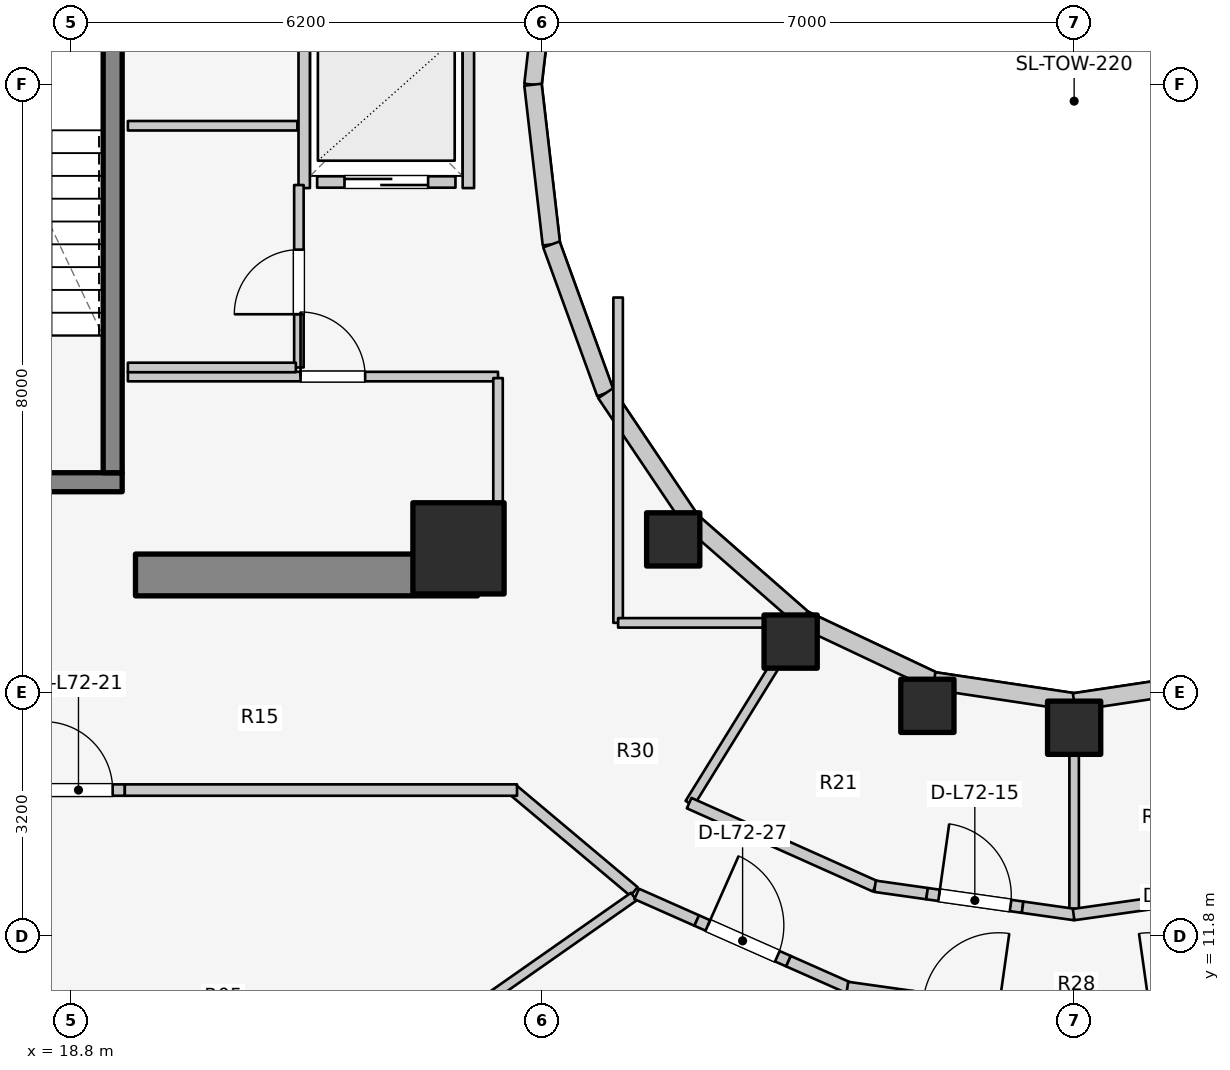
"""IFC4 building model, lengths in metres.
Left out: names, types, materials, properties, quantities, classifications, styles, units other than length and angle.
Written with IfcOpenShell. Run it as: python <this file> out.ifc"""

import sys

from ifc_helpers import new_model, si_unit, direction, frame, frame_2d, origin, origin_2d, place, context, subcontext, project, spatial, rectangle, extrude, element, fill, save


model = new_model("IFC4")
c1 = context("Model", 3, precision=1e-05, world=origin(), true_north=direction((0.0, 1.0)))
c2 = subcontext(c1, "Body", "Model", "MODEL_VIEW")
j1 = project(units=[si_unit("LENGTHUNIT", "METRE"), si_unit("PLANEANGLEUNIT", "RADIAN")], contexts=[c1])
p1 = place(None, origin())
s1 = spatial("IfcSite", under=j1, at=p1, CompositionType="ELEMENT")
p2 = place(p1, origin())
s2 = spatial("IfcBuilding", under=s1, at=p2, CompositionType="ELEMENT")
p3 = place(p2, frame((0.0, 0.0, 235.7)))
s3 = spatial("IfcBuildingStorey", under=s2, at=p3, CompositionType="ELEMENT", Elevation=235.7)
p4 = place(p3, frame((19.65, 16.55, 0.0), z_axis=(0.0, 0.0, 1.0), x_axis=(1.0, 0.0, 0.0)))
e1 = element("IfcWall", 1, at=p4, inside=s3, PredefinedType="SHEAR", context=c2, shape_type="SweptSolid", body=[
    extrude(rectangle(XDim=4.5, YDim=0.55, at=frame_2d((2.25, 0.0))), origin(), (0.0, 0.0, 1.0), 3.1),
])
p5 = place(p3, frame((16.105, 17.77, 0.0), z_axis=(0.0, 0.0, 1.0), x_axis=(1.0, 0.0, 0.0)))
e2 = element("IfcWall", 2, at=p5, inside=s3, PredefinedType="SOLIDWALL", context=c2, shape_type="SweptSolid", body=[
    extrude(rectangle(XDim=3.37, YDim=0.25, at=frame_2d((1.685, 0.0))), origin(), (0.0, 0.0, 1.0), 3.1),
])
p6 = place(p5, frame((1.135, 0.0, 0.0)))
e3 = element("IfcOpeningElement", 3, at=p6, cuts=e2, PredefinedType="OPENING", context=c2, shape_type="SweptSolid", body=[
    extrude(rectangle(XDim=1.1, YDim=2.1, at=frame_2d((0.55, 1.05))), frame((0.0, 0.135, 0.0), z_axis=(0.0, -1.0, 0.0), x_axis=(1.0, 0.0, 0.0)), (0.0, 0.0, 1.0), 0.27),
])
p7 = place(p3, frame((19.35, 17.895, 0.0), z_axis=(0.0, 0.0, 1.0), x_axis=(0.0, 1.0, 0.0)))
e4 = element("IfcWall", 4, at=p7, inside=s3, PredefinedType="SOLIDWALL", context=c2, shape_type="SweptSolid", body=[
    extrude(rectangle(XDim=7.81, YDim=0.25, at=frame_2d((3.905, 0.0))), origin(), (0.0, 0.0, 1.0), 3.1),
])
p8 = place(p3, frame((23.9, 16.9, 0.0), z_axis=(0.0, 0.0, 1.0), x_axis=(1.0, 0.0, 0.0)))
e5 = element("IfcColumn", 5, at=p8, inside=s3, PredefinedType="COLUMN", context=c2, shape_type="SweptSolid", body=[
    extrude(rectangle(XDim=1.2, YDim=1.2, at=origin_2d()), origin(), (0.0, 0.0, 1.0), 3.1),
])
for number, where, z_axis, x_axis in (
    (6, (26.725, 17.018, 0.0), (0.0, 0.0, 1.0), (1.0, 0.0, 0.0)),
    (7, (28.27, 15.673, 0.0), (0.0, 0.0, 1.0), (1.0, 0.0, 0.0)),
    (8, (30.069, 14.828, 0.0), (0.0, 0.0, 1.0), (1.0, 0.0, 0.0)),
    (9, (32.0, 14.54, 0.0), (0.0, 0.0, 1.0), (1.0, 0.0, 0.0)),
):
    element("IfcColumn", number, at=place(p3, frame(where, z_axis=z_axis, x_axis=x_axis)), inside=s3, PredefinedType="COLUMN", context=c2, shape_type="SweptSolid", body=[
        extrude(rectangle(XDim=0.7, YDim=0.7, at=origin_2d()), origin(), (0.0, 0.0, 1.0), 3.1),
    ])
for number, where, z_axis, x_axis in (
    (10, (25.123, 25.102, 0.0), (0.0, 0.0, 1.0), (-0.115, -0.993, 0.0)),
    (11, (24.88, 23.0, 0.0), (0.0, 0.0, 1.0), (0.115, -0.993, 0.0)),
):
    element("IfcWall", number, at=place(p3, frame(where, z_axis=z_axis, x_axis=x_axis)), inside=s3, PredefinedType="STANDARD", context=c2, shape_type="SweptSolid", body=[
        extrude(rectangle(XDim=2.115, YDim=0.23, at=frame_2d((1.058, 0.0))), origin(), (0.0, 0.0, 1.0), 2.56),
    ])
p9 = place(p3, frame((25.123, 20.898, 0.0), z_axis=(0.0, 0.0, 1.0), x_axis=(0.341423187295, -0.93990968033, 0.0)))
e12 = element("IfcWall", 12, at=p9, inside=s3, PredefinedType="STANDARD", context=c2, shape_type="SweptSolid", body=[
    extrude(rectangle(XDim=2.084, YDim=0.23, at=frame_2d((1.042, 0.0))), origin(), (0.0, 0.0, 1.0), 2.56),
])
p10 = place(p3, frame((25.834, 18.94, 0.0), z_axis=(0.0, 0.0, 1.0), x_axis=(0.558197800898, -0.829707909492, 0.0)))
e13 = element("IfcWall", 13, at=p10, inside=s3, PredefinedType="STANDARD", context=c2, shape_type="SweptSolid", body=[
    extrude(rectangle(XDim=2.027, YDim=0.23, at=frame_2d((1.013, 0.0))), origin(), (0.0, 0.0, 1.0), 1.22),
])
p11 = place(p3, frame((26.965, 17.258, 0.0), z_axis=(0.0, 0.0, 1.0), x_axis=(0.752576694707, -0.658504607869, 0.0)))
e14 = element("IfcWall", 14, at=p11, inside=s3, PredefinedType="STANDARD", context=c2, shape_type="SweptSolid", body=[
    extrude(rectangle(XDim=1.959, YDim=0.23, at=frame_2d((0.98, 0.0))), origin(), (0.0, 0.0, 1.0), 1.22),
])
p12 = place(p3, frame((28.44, 15.968, 0.0), z_axis=(0.0, 0.0, 1.0), x_axis=(0.904179699603, -0.427152280606, 0.0)))
e15 = element("IfcWall", 15, at=p12, inside=s3, PredefinedType="STANDARD", context=c2, shape_type="SweptSolid", body=[
    extrude(rectangle(XDim=1.899, YDim=0.23, at=frame_2d((0.95, 0.0))), origin(), (0.0, 0.0, 1.0), 1.22),
])
for number, where, z_axis, x_axis in (
    (16, (30.157, 15.157, 0.0), (0.0, 0.0, 1.0), (0.989, -0.149, 0.0)),
    (17, (32.0, 14.88, 0.0), (0.0, 0.0, 1.0), (0.989, 0.149, 0.0)),
):
    element("IfcWall", number, at=place(p3, frame(where, z_axis=z_axis, x_axis=x_axis)), inside=s3, PredefinedType="STANDARD", context=c2, shape_type="SweptSolid", body=[
        extrude(rectangle(XDim=1.864, YDim=0.23, at=frame_2d((0.932, 0.0))), origin(), (0.0, 0.0, 1.0), 1.22),
    ])
p13 = place(p3, frame((22.04, 21.72, 0.0), z_axis=(0.0, 0.0, 1.0), x_axis=(1.0, 0.0, 0.0)))
e18 = element("IfcWall", 18, at=p13, inside=s3, PredefinedType="SOLIDWALL", context=c2, shape_type="SweptSolid", body=[
    extrude(rectangle(XDim=1.82, YDim=0.15, at=frame_2d((0.91, 0.0))), origin(), (0.0, 0.0, 1.0), 2.12),
])
p14 = place(p13, frame((0.36, 0.0, 0.0)))
e19 = element("IfcOpeningElement", 19, at=p14, cuts=e18, PredefinedType="OPENING", context=c2, shape_type="SweptSolid", body=[
    extrude(rectangle(XDim=1.1, YDim=2.1, at=frame_2d((0.55, 1.05))), frame((0.0, 0.085, 0.0), z_axis=(0.0, -1.0, 0.0), x_axis=(1.0, 0.0, 0.0)), (0.0, 0.0, 1.0), 0.17),
])
p15 = place(p3, frame((21.87, 21.64, 0.0), z_axis=(0.0, 0.0, 1.0), x_axis=(0.0, 1.0, 0.0)))
e20 = element("IfcWall", 20, at=p15, inside=s3, PredefinedType="SOLIDWALL", context=c2, shape_type="SweptSolid", body=[
    extrude(rectangle(XDim=2.32, YDim=0.15, at=frame_2d((1.16, 0.0))), origin(), (0.0, 0.0, 1.0), 2.575),
])
p16 = place(p3, frame((24.03, 21.64, 0.0), z_axis=(0.0, 0.0, 1.0), x_axis=(0.0, 1.0, 0.0)))
e21 = element("IfcWall", 21, at=p16, inside=s3, PredefinedType="SOLIDWALL", context=c2, shape_type="SweptSolid", body=[
    extrude(rectangle(XDim=2.32, YDim=0.15, at=frame_2d((1.16, 0.0))), origin(), (0.0, 0.0, 1.0), 2.12),
])
p17 = place(p3, frame((19.55, 19.16, 0.0), z_axis=(0.0, 0.0, 1.0), x_axis=(1.0, 0.0, 0.0)))
e22 = element("IfcWall", 22, at=p17, inside=s3, PredefinedType="PARTITIONING", context=c2, shape_type="SweptSolid", body=[
    extrude(rectangle(XDim=4.87, YDim=0.125, at=frame_2d((2.435, 0.0))), origin(), (0.0, 0.0, 1.0), 2.12),
])
p18 = place(p17, frame((2.272, 0.0, 0.0)))
e23 = element("IfcOpeningElement", 23, at=p18, cuts=e22, PredefinedType="OPENING", context=c2, shape_type="SweptSolid", body=[
    extrude(rectangle(XDim=0.85, YDim=2.05, at=frame_2d((0.425, 1.025))), frame((0.0, 0.073, 0.0), z_axis=(0.0, -1.0, 0.0), x_axis=(1.0, 0.0, 0.0)), (0.0, 0.0, 1.0), 0.145),
])
p19 = place(p3, frame((24.42, 17.1, 0.0), z_axis=(0.0, 0.0, 1.0), x_axis=(0.0, 1.0, 0.0)))
e24 = element("IfcWall", 24, at=p19, inside=s3, PredefinedType="PARTITIONING", context=c2, shape_type="SweptSolid", body=[
    extrude(rectangle(XDim=2.04, YDim=0.125, at=frame_2d((1.02, 0.0))), origin(), (0.0, 0.0, 1.0), 1.952),
])
p20 = place(p3, frame((21.8, 19.28, 0.0), z_axis=(0.0, 0.0, 1.0), x_axis=(0.0, 1.0, 0.0)))
e25 = element("IfcWall", 25, at=p20, inside=s3, PredefinedType="PARTITIONING", context=c2, shape_type="SweptSolid", body=[
    extrude(rectangle(XDim=2.4, YDim=0.125, at=frame_2d((1.2, 0.0))), origin(), (0.0, 0.0, 1.0), 2.575),
])
p21 = place(p20, frame((0.7, 0.0, 0.0)))
e26 = element("IfcOpeningElement", 26, at=p21, cuts=e25, PredefinedType="OPENING", context=c2, shape_type="SweptSolid", body=[
    extrude(rectangle(XDim=0.85, YDim=2.05, at=frame_2d((0.425, 1.025))), frame((0.0, 0.073, 0.0), z_axis=(0.0, -1.0, 0.0), x_axis=(1.0, 0.0, 0.0)), (0.0, 0.0, 1.0), 0.145),
])
p22 = place(p3, frame((19.55, 19.28, 0.0), z_axis=(0.0, 0.0, 1.0), x_axis=(1.0, 0.0, 0.0)))
e27 = element("IfcWall", 27, at=p22, inside=s3, PredefinedType="PARTITIONING", context=c2, shape_type="SweptSolid", body=[
    extrude(rectangle(XDim=2.21, YDim=0.125, at=frame_2d((1.105, 0.0))), origin(), (0.0, 0.0, 1.0), 2.12),
])
p23 = place(p3, frame((19.55, 22.46, 0.0), z_axis=(0.0, 0.0, 1.0), x_axis=(1.0, 0.0, 0.0)))
e28 = element("IfcWall", 28, at=p23, inside=s3, PredefinedType="PARTITIONING", context=c2, shape_type="SweptSolid", body=[
    extrude(rectangle(XDim=2.23, YDim=0.125, at=frame_2d((1.115, 0.0))), origin(), (0.0, 0.0, 1.0), 2.575),
])
p24 = place(p3, frame((28.45, 15.985, 0.0), z_axis=(0.0, 0.0, 1.0), x_axis=(-0.52592395012, -0.850531597702, 0.0)))
e29 = element("IfcWall", 29, at=p24, inside=s3, PredefinedType="PARTITIONING", context=c2, shape_type="SweptSolid", body=[
    extrude(rectangle(XDim=2.869, YDim=0.125, at=frame_2d((1.435, 0.0))), origin(), (0.0, 0.0, 1.0), 2.096),
])
p25 = place(p3, frame((32.0, 14.9, 0.0), z_axis=(0.0, 0.0, 1.0), x_axis=(0.0, -1.0, 0.0)))
e30 = element("IfcWall", 30, at=p25, inside=s3, PredefinedType="PARTITIONING", context=c2, shape_type="SweptSolid", body=[
    extrude(rectangle(XDim=2.818, YDim=0.125, at=frame_2d((1.409, 0.0))), origin(), (0.0, 0.0, 1.0), 2.096),
])
p26 = place(p3, frame((26.935, 13.549, 0.0), z_axis=(0.0, 0.0, 1.0), x_axis=(0.912859324183, -0.408274239027, 0.0)))
e31 = element("IfcWall", 31, at=p26, inside=s3, PredefinedType="PARTITIONING", context=c2, shape_type="SweptSolid", body=[
    extrude(rectangle(XDim=2.682, YDim=0.15, at=frame_2d((1.341, 0.0))), origin(), (0.0, 0.0, 1.0), 2.096),
])
p27 = place(p3, frame((29.38, 12.455, 0.0), z_axis=(0.0, 0.0, 1.0), x_axis=(0.990090139669, -0.140433312754, 0.0)))
e32 = element("IfcWall", 32, at=p27, inside=s3, PredefinedType="PARTITIONING", context=c2, shape_type="SweptSolid", body=[
    extrude(rectangle(XDim=0.692, YDim=0.15, at=frame_2d((0.346, 0.0))), origin(), (0.0, 0.0, 1.0), 2.575),
])
p28 = place(p3, frame((30.065, 12.357, 0.0), z_axis=(0.0, 0.0, 1.0), x_axis=(0.990102710588, -0.140344656064, 0.0)))
e33 = element("IfcWall", 33, at=p28, inside=s3, PredefinedType="PARTITIONING", context=c2, shape_type="SweptSolid", body=[
    extrude(rectangle(XDim=1.27, YDim=0.15, at=frame_2d((0.635, 0.0))), origin(), (0.0, 0.0, 1.0), 2.575),
])
p29 = place(p28, frame((0.16, 0.0, 0.0)))
e34 = element("IfcOpeningElement", 34, at=p29, cuts=e33, PredefinedType="OPENING", context=c2, shape_type="SweptSolid", body=[
    extrude(rectangle(XDim=0.95, YDim=2.1, at=frame_2d((0.475, 1.05))), frame((0.0, 0.085, 0.0), z_axis=(0.0, -1.0, 0.0), x_axis=(1.0, 0.0, 0.0)), (0.0, 0.0, 1.0), 0.17),
])
p30 = place(p3, frame((31.322, 12.179, 0.0), z_axis=(0.0, 0.0, 1.0), x_axis=(0.990090139669, -0.140433312754, 0.0)))
e35 = element("IfcWall", 35, at=p30, inside=s3, PredefinedType="PARTITIONING", context=c2, shape_type="SweptSolid", body=[
    extrude(rectangle(XDim=0.692, YDim=0.15, at=frame_2d((0.346, 0.0))), origin(), (0.0, 0.0, 1.0), 2.096),
])
p31 = place(p3, frame((31.993, 12.082, 0.0), z_axis=(0.0, 0.0, 1.0), x_axis=(0.990096156252, 0.140390887794, 0.0)))
e36 = element("IfcWall", 36, at=p31, inside=s3, PredefinedType="PARTITIONING", context=c2, shape_type="SweptSolid", body=[
    extrude(rectangle(XDim=2.654, YDim=0.15, at=frame_2d((1.327, 0.0))), origin(), (0.0, 0.0, 1.0), 2.096),
])
p32 = place(p3, frame((26.0, 15.92, 0.0), z_axis=(0.0, 0.0, 1.0), x_axis=(0.0, 1.0, 0.0)))
e37 = element("IfcWall", 37, at=p32, inside=s3, PredefinedType="PARTITIONING", context=c2, shape_type="SweptSolid", body=[
    extrude(rectangle(XDim=4.28, YDim=0.125, at=frame_2d((2.14, 0.0))), origin(), (0.0, 0.0, 1.0), 1.952),
])
p33 = place(p3, frame((26.0, 15.92, 0.0), z_axis=(0.0, 0.0, 1.0), x_axis=(1.0, 0.0, 0.0)))
e38 = element("IfcWall", 38, at=p33, inside=s3, PredefinedType="PARTITIONING", context=c2, shape_type="SweptSolid", body=[
    extrude(rectangle(XDim=2.6, YDim=0.125, at=frame_2d((1.3, 0.0))), origin(), (0.0, 0.0, 1.0), 1.952),
])
p34 = place(p3, frame((26.209, 12.385, 0.0), z_axis=(0.0, 0.0, 1.0), x_axis=(-0.765677451641, 0.643224719711, 0.0)))
e39 = element("IfcWall", 39, at=p34, inside=s3, PredefinedType="PARTITIONING", context=c2, shape_type="SweptSolid", body=[
    extrude(rectangle(XDim=2.105, YDim=0.15, at=frame_2d((1.053, 0.0))), origin(), (0.0, 0.0, 1.0), 2.096),
])
p35 = place(p3, frame((18.29, 13.72, 0.0), z_axis=(0.0, 0.0, 1.0), x_axis=(1.0, 0.0, 0.0)))
e40 = element("IfcWall", 40, at=p35, inside=s3, PredefinedType="PARTITIONING", context=c2, shape_type="SweptSolid", body=[
    extrude(rectangle(XDim=1.22, YDim=0.15, at=frame_2d((0.61, 0.0))), origin(), (0.0, 0.0, 1.0), 2.575),
])
p36 = place(p35, frame((0.16, 0.0, 0.0)))
e41 = element("IfcOpeningElement", 41, at=p36, cuts=e40, PredefinedType="OPENING", context=c2, shape_type="SweptSolid", body=[
    extrude(rectangle(XDim=0.9, YDim=2.1, at=frame_2d((0.45, 1.05))), frame((0.0, 0.085, 0.0), z_axis=(0.0, -1.0, 0.0), x_axis=(1.0, 0.0, 0.0)), (0.0, 0.0, 1.0), 0.17),
])
p37 = place(p3, frame((19.51, 13.72, 0.0), z_axis=(0.0, 0.0, 1.0), x_axis=(1.0, 0.0, 0.0)))
e42 = element("IfcWall", 42, at=p37, inside=s3, PredefinedType="PARTITIONING", context=c2, shape_type="SweptSolid", body=[
    extrude(rectangle(XDim=5.16, YDim=0.15, at=frame_2d((2.58, 0.0))), origin(), (0.0, 0.0, 1.0), 2.096),
])
p38 = place(p3, frame((26.206, 12.318, 0.0), z_axis=(0.0, 0.0, 1.0), x_axis=(-0.819017716307, -0.573768228796, 0.0)))
e43 = element("IfcWall", 43, at=p38, inside=s3, PredefinedType="PARTITIONING", context=c2, shape_type="SweptSolid", body=[
    extrude(rectangle(XDim=6.802, YDim=0.125, at=frame_2d((3.401, 0.0))), origin(), (0.0, 0.0, 1.0), 1.22),
])
p39 = place(p3, frame((28.992, 11.077, 0.0), z_axis=(0.0, 0.0, 1.0), x_axis=(-0.590771495169, -0.806838918555, 0.0)))
e44 = element("IfcWall", 44, at=p39, inside=s3, PredefinedType="PARTITIONING", context=c2, shape_type="SweptSolid", body=[
    extrude(rectangle(XDim=6.347, YDim=0.125, at=frame_2d((3.173, 0.0))), origin(), (0.0, 0.0, 1.0), 1.22),
])
p40 = place(p3, frame((26.244, 12.354, 0.0), z_axis=(0.0, 0.0, 1.0), x_axis=(0.914241833088, -0.405168940853, 0.0)))
e45 = element("IfcWall", 45, at=p40, inside=s3, PredefinedType="PARTITIONING", context=c2, shape_type="SweptSolid", body=[
    extrude(rectangle(XDim=0.865, YDim=0.15, at=frame_2d((0.432, 0.0))), origin(), (0.0, 0.0, 1.0), 2.575),
])
p41 = place(p3, frame((27.034, 12.004, 0.0), z_axis=(0.0, 0.0, 1.0), x_axis=(0.914314172667, -0.405005671145, 0.0)))
e46 = element("IfcWall", 46, at=p41, inside=s3, PredefinedType="PARTITIONING", context=c2, shape_type="SweptSolid", body=[
    extrude(rectangle(XDim=1.32, YDim=0.15, at=frame_2d((0.66, 0.0))), origin(), (0.0, 0.0, 1.0), 2.16),
])
p42 = place(p41, frame((0.16, 0.0, 0.0)))
e47 = element("IfcOpeningElement", 47, at=p42, cuts=e46, PredefinedType="OPENING", context=c2, shape_type="SweptSolid", body=[
    extrude(rectangle(XDim=1.0, YDim=2.1, at=frame_2d((0.5, 1.05))), frame((0.0, 0.085, 0.0), z_axis=(0.0, -1.0, 0.0), x_axis=(1.0, 0.0, 0.0)), (0.0, 0.0, 1.0), 0.17),
])
p43 = place(p3, frame((28.241, 11.469, 0.0), z_axis=(0.0, 0.0, 1.0), x_axis=(0.914346402493, -0.40493290339, 0.0)))
e48 = element("IfcWall", 48, at=p43, inside=s3, PredefinedType="PARTITIONING", context=c2, shape_type="SweptSolid", body=[
    extrude(rectangle(XDim=0.865, YDim=0.15, at=frame_2d((0.432, 0.0))), origin(), (0.0, 0.0, 1.0), 2.096),
])
p44 = place(p3, frame((29.016, 11.123, 0.0), z_axis=(0.0, 0.0, 1.0), x_axis=(0.99022315503, -0.139492305317, 0.0)))
e49 = element("IfcWall", 49, at=p44, inside=s3, PredefinedType="PARTITIONING", context=c2, shape_type="SweptSolid", body=[
    extrude(rectangle(XDim=0.851, YDim=0.15, at=frame_2d((0.425, 0.0))), origin(), (0.0, 0.0, 1.0), 2.575),
])
p45 = place(p14, origin())
e50 = element("IfcDoor", 50, at=p45, inside=s3, OperationType="DOUBLE_DOOR_SLIDING", PredefinedType="DOOR", context=c2, shape_type="SweptSolid", body=[
    extrude(rectangle(XDim=1.1, YDim=2.1, at=frame_2d((0.55, 1.05))), frame((0.0, 0.025, 0.0), z_axis=(0.0, -1.0, 0.0), x_axis=(1.0, 0.0, 0.0)), (0.0, 0.0, 1.0), 0.05),
])
fill(e19, e50)
p46 = place(p18, origin())
e51 = element("IfcDoor", 51, at=p46, inside=s3, OperationType="SINGLE_SWING_LEFT", PredefinedType="DOOR", context=c2, shape_type="SweptSolid", body=[
    extrude(rectangle(XDim=0.85, YDim=2.05, at=frame_2d((0.425, 1.025))), frame((0.0, 0.025, 0.0), z_axis=(0.0, -1.0, 0.0), x_axis=(1.0, 0.0, 0.0)), (0.0, 0.0, 1.0), 0.05),
])
fill(e23, e51)
p47 = place(p21, origin())
e52 = element("IfcDoor", 52, at=p47, inside=s3, OperationType="SINGLE_SWING_LEFT", PredefinedType="DOOR", context=c2, shape_type="SweptSolid", body=[
    extrude(rectangle(XDim=0.85, YDim=2.05, at=frame_2d((0.425, 1.025))), frame((0.0, 0.025, 0.0), z_axis=(0.0, -1.0, 0.0), x_axis=(1.0, 0.0, 0.0)), (0.0, 0.0, 1.0), 0.05),
])
fill(e26, e52)
p48 = place(p29, origin())
e53 = element("IfcDoor", 53, at=p48, inside=s3, OperationType="SINGLE_SWING_LEFT", PredefinedType="DOOR", context=c2, shape_type="SweptSolid", body=[
    extrude(rectangle(XDim=0.95, YDim=2.1, at=frame_2d((0.475, 1.05))), frame((0.0, 0.025, 0.0), z_axis=(0.0, -1.0, 0.0), x_axis=(1.0, 0.0, 0.0)), (0.0, 0.0, 1.0), 0.05),
])
fill(e34, e53)
p49 = place(p36, origin())
e54 = element("IfcDoor", 54, at=p49, inside=s3, OperationType="SINGLE_SWING_LEFT", PredefinedType="DOOR", context=c2, shape_type="SweptSolid", body=[
    extrude(rectangle(XDim=0.9, YDim=2.1, at=frame_2d((0.45, 1.05))), frame((0.0, 0.025, 0.0), z_axis=(0.0, -1.0, 0.0), x_axis=(1.0, 0.0, 0.0)), (0.0, 0.0, 1.0), 0.05),
])
fill(e41, e54)
p50 = place(p42, origin())
e55 = element("IfcDoor", 55, at=p50, inside=s3, OperationType="SINGLE_SWING_LEFT", PredefinedType="DOOR", context=c2, shape_type="SweptSolid", body=[
    extrude(rectangle(XDim=1.0, YDim=2.1, at=frame_2d((0.5, 1.05))), frame((0.0, 0.025, 0.0), z_axis=(0.0, -1.0, 0.0), x_axis=(1.0, 0.0, 0.0)), (0.0, 0.0, 1.0), 0.05),
])
fill(e47, e55)
save(model, sys.argv[1])
